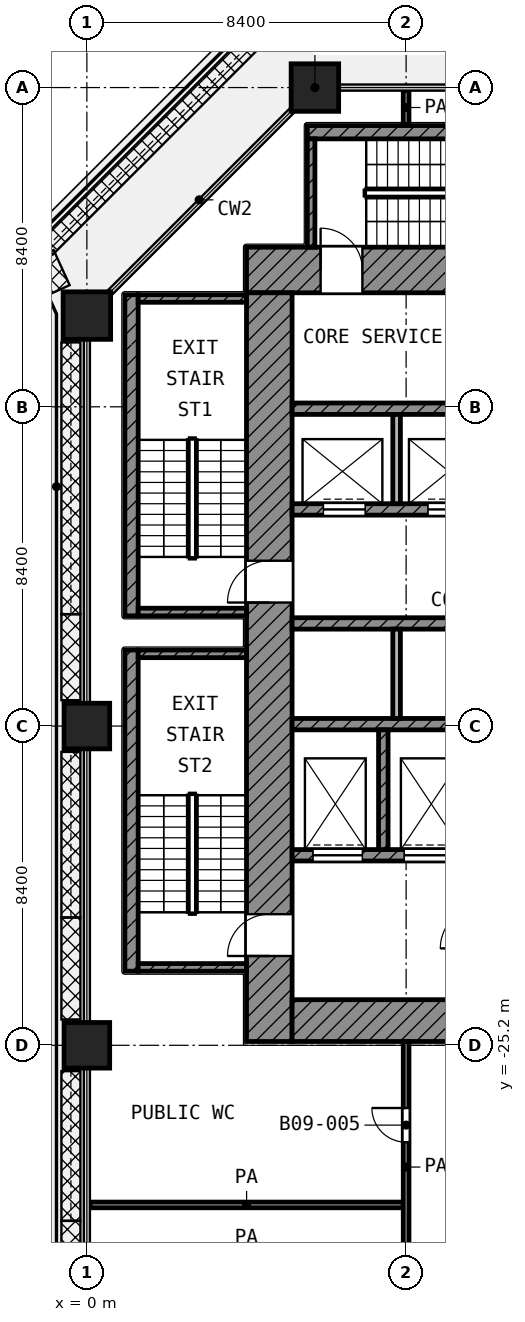
"""IFC4 building model, lengths in metres.
Left out: names, types, materials, properties, quantities, classifications, styles, units other than length and angle.
Written with IfcOpenShell. Run it as: python <this file> out.ifc"""

import sys

from ifc_helpers import new_model, si_unit, direction, frame, frame_2d, origin, origin_2d, place, context, subcontext, project, spatial, rectangle, extrude, element, fill, save


model = new_model("IFC4")
c1 = context("Model", 3, precision=1e-05, world=origin(), true_north=direction((0.0, 1.0)))
c2 = subcontext(c1, "Body", "Model", "MODEL_VIEW")
j1 = project(units=[si_unit("LENGTHUNIT", "METRE"), si_unit("PLANEANGLEUNIT", "RADIAN")], contexts=[c1])
p1 = place(None, origin())
s1 = spatial("IfcSite", under=j1, at=p1, CompositionType="ELEMENT")
p2 = place(p1, origin())
s2 = spatial("IfcBuilding", under=s1, at=p2, CompositionType="ELEMENT")
p3 = place(p2, frame((0.0, 0.0, 43.4)))
s3 = spatial("IfcBuildingStorey", under=s2, at=p3, CompositionType="ELEMENT", Elevation=43.4)
for number, where, z_axis, x_axis in (
    (1, (6.0, 0.0, 0.0), (0.0, 0.0, 1.0), (1.0, 0.0, 0.0)),
    (2, (0.0, -6.0, 0.0), (0.0, 0.0, 1.0), (1.0, 0.0, 0.0)),
):
    element("IfcColumn", number, at=place(p3, frame(where, z_axis=z_axis, x_axis=x_axis)), inside=s3, PredefinedType="COLUMN", context=c2, shape_type="SweptSolid", body=[
        extrude(rectangle(XDim=1.25, YDim=1.25, at=origin_2d()), origin(), (0.0, 0.0, 1.0), 4.2),
    ])
for number, where, z_axis, x_axis in (
    (3, (0.0, -16.8, 0.0), (0.0, 0.0, 1.0), (1.0, 0.0, 0.0)),
    (4, (0.0, -25.2, 0.0), (0.0, 0.0, 1.0), (1.0, 0.0, 0.0)),
):
    element("IfcColumn", number, at=place(p3, frame(where, z_axis=z_axis, x_axis=x_axis)), inside=s3, PredefinedType="COLUMN", context=c2, shape_type="SweptSolid", body=[
        extrude(rectangle(XDim=1.2, YDim=1.2, at=origin_2d()), origin(), (0.0, 0.0, 1.0), 4.2),
    ])
p4 = place(p3, frame((4.2, -4.8, 0.0), z_axis=(0.0, 0.0, 1.0), x_axis=(1.0, 0.0, 0.0)))
e5 = element("IfcWall", 5, at=p4, inside=s3, PredefinedType="SHEAR", context=c2, shape_type="SweptSolid", body=[
    extrude(rectangle(XDim=20.9, YDim=1.2, at=frame_2d((10.45, 0.0))), origin(), (0.0, 0.0, 1.0), 3.9),
])
p5 = place(p4, frame((1.95, 0.0, 0.0)))
e6 = element("IfcOpeningElement", 6, at=p5, cuts=e5, PredefinedType="OPENING", context=c2, shape_type="SweptSolid", body=[
    extrude(rectangle(XDim=1.1, YDim=2.1, at=frame_2d((0.55, 1.05))), frame((0.0, 0.61, 0.0), z_axis=(0.0, -1.0, 0.0), x_axis=(1.0, 0.0, 0.0)), (0.0, 0.0, 1.0), 1.22),
])
p6 = place(p4, frame((17.95, 0.0, 0.0)))
e7 = element("IfcOpeningElement", 7, at=p6, cuts=e5, PredefinedType="OPENING", context=c2, shape_type="SweptSolid", body=[
    extrude(rectangle(XDim=1.1, YDim=2.1, at=frame_2d((0.55, 1.05))), frame((0.0, 0.61, 0.0), z_axis=(0.0, -1.0, 0.0), x_axis=(1.0, 0.0, 0.0)), (0.0, 0.0, 1.0), 1.22),
])
p7 = place(p3, frame((4.8, -25.1, 0.0), z_axis=(0.0, 0.0, 1.0), x_axis=(0.0, 1.0, 0.0)))
e8 = element("IfcWall", 8, at=p7, inside=s3, PredefinedType="SHEAR", context=c2, shape_type="SweptSolid", body=[
    extrude(rectangle(XDim=19.7, YDim=1.2, at=frame_2d((9.85, 0.0))), origin(), (0.0, 0.0, 1.0), 3.9),
])
p8 = place(p7, frame((11.55, 0.0, 0.0)))
e9 = element("IfcOpeningElement", 9, at=p8, cuts=e8, PredefinedType="OPENING", context=c2, shape_type="SweptSolid", body=[
    extrude(rectangle(XDim=1.1, YDim=2.1, at=frame_2d((0.55, 1.05))), frame((0.0, 0.61, 0.0), z_axis=(0.0, -1.0, 0.0), x_axis=(1.0, 0.0, 0.0)), (0.0, 0.0, 1.0), 1.22),
])
p9 = place(p7, frame((2.25, 0.0, 0.0)))
e10 = element("IfcOpeningElement", 10, at=p9, cuts=e8, PredefinedType="OPENING", context=c2, shape_type="SweptSolid", body=[
    extrude(rectangle(XDim=1.1, YDim=2.1, at=frame_2d((0.55, 1.05))), frame((0.0, 0.61, 0.0), z_axis=(0.0, -1.0, 0.0), x_axis=(1.0, 0.0, 0.0)), (0.0, 0.0, 1.0), 1.22),
])
p10 = place(p3, frame((5.4, -24.55, 0.0), z_axis=(0.0, 0.0, 1.0), x_axis=(1.0, 0.0, 0.0)))
e11 = element("IfcWall", 11, at=p10, inside=s3, PredefinedType="SHEAR", context=c2, shape_type="SweptSolid", body=[
    extrude(rectangle(XDim=18.6, YDim=1.1, at=frame_2d((9.3, 0.0))), origin(), (0.0, 0.0, 1.0), 3.9),
])
p11 = place(p10, frame((6.3, 0.0, 0.0)))
e12 = element("IfcOpeningElement", 12, at=p11, cuts=e11, PredefinedType="OPENING", context=c2, shape_type="SweptSolid", body=[
    extrude(rectangle(XDim=1.8, YDim=2.1, at=frame_2d((0.9, 1.05))), frame((0.0, 0.56, 0.0), z_axis=(0.0, -1.0, 0.0), x_axis=(1.0, 0.0, 0.0)), (0.0, 0.0, 1.0), 1.12),
])
p12 = place(p3, frame((5.4, -8.45, 0.0), z_axis=(0.0, 0.0, 1.0), x_axis=(1.0, 0.0, 0.0)))
e13 = element("IfcWall", 13, at=p12, inside=s3, PredefinedType="SHEAR", context=c2, shape_type="SweptSolid", body=[
    extrude(rectangle(XDim=16.65, YDim=0.3, at=frame_2d((8.325, 0.0))), origin(), (0.0, 0.0, 1.0), 3.9),
])
p13 = place(p3, frame((5.4, -11.1, 0.0), z_axis=(0.0, 0.0, 1.0), x_axis=(1.0, 0.0, 0.0)))
e14 = element("IfcWall", 14, at=p13, inside=s3, PredefinedType="SHEAR", context=c2, shape_type="SweptSolid", body=[
    extrude(rectangle(XDim=16.65, YDim=0.3, at=frame_2d((8.325, 0.0))), origin(), (0.0, 0.0, 1.0), 3.9),
])
p14 = place(p13, frame((0.825, 0.0, 0.0)))
e15 = element("IfcOpeningElement", 15, at=p14, cuts=e14, PredefinedType="OPENING", context=c2, shape_type="SweptSolid", body=[
    extrude(rectangle(XDim=1.1, YDim=2.1, at=frame_2d((0.55, 1.05))), frame((0.0, 0.16, 0.0), z_axis=(0.0, -1.0, 0.0), x_axis=(1.0, 0.0, 0.0)), (0.0, 0.0, 1.0), 0.32),
])
p15 = place(p13, frame((3.575, 0.0, 0.0)))
e16 = element("IfcOpeningElement", 16, at=p15, cuts=e14, PredefinedType="OPENING", context=c2, shape_type="SweptSolid", body=[
    extrude(rectangle(XDim=1.1, YDim=2.1, at=frame_2d((0.55, 1.05))), frame((0.0, 0.16, 0.0), z_axis=(0.0, -1.0, 0.0), x_axis=(1.0, 0.0, 0.0)), (0.0, 0.0, 1.0), 0.32),
])
p16 = place(p13, frame((6.325, 0.0, 0.0)))
e17 = element("IfcOpeningElement", 17, at=p16, cuts=e14, PredefinedType="OPENING", context=c2, shape_type="SweptSolid", body=[
    extrude(rectangle(XDim=1.1, YDim=2.1, at=frame_2d((0.55, 1.05))), frame((0.0, 0.16, 0.0), z_axis=(0.0, -1.0, 0.0), x_axis=(1.0, 0.0, 0.0)), (0.0, 0.0, 1.0), 0.32),
])
p17 = place(p13, frame((9.075, 0.0, 0.0)))
e18 = element("IfcOpeningElement", 18, at=p17, cuts=e14, PredefinedType="OPENING", context=c2, shape_type="SweptSolid", body=[
    extrude(rectangle(XDim=1.1, YDim=2.1, at=frame_2d((0.55, 1.05))), frame((0.0, 0.16, 0.0), z_axis=(0.0, -1.0, 0.0), x_axis=(1.0, 0.0, 0.0)), (0.0, 0.0, 1.0), 0.32),
])
for number, where, z_axis, x_axis in (
    (19, (5.4, -14.1, 0.0), (0.0, 0.0, 1.0), (1.0, 0.0, 0.0)),
    (20, (5.4, -16.75, 0.0), (0.0, 0.0, 1.0), (1.0, 0.0, 0.0)),
):
    element("IfcWall", number, at=place(p3, frame(where, z_axis=z_axis, x_axis=x_axis)), inside=s3, PredefinedType="SHEAR", context=c2, shape_type="SweptSolid", body=[
        extrude(rectangle(XDim=16.65, YDim=0.3, at=frame_2d((8.325, 0.0))), origin(), (0.0, 0.0, 1.0), 3.9),
    ])
p18 = place(p3, frame((5.4, -20.2, 0.0), z_axis=(0.0, 0.0, 1.0), x_axis=(1.0, 0.0, 0.0)))
e21 = element("IfcWall", 21, at=p18, inside=s3, PredefinedType="SHEAR", context=c2, shape_type="SweptSolid", body=[
    extrude(rectangle(XDim=14.65, YDim=0.3, at=frame_2d((7.325, 0.0))), origin(), (0.0, 0.0, 1.0), 3.9),
])
p19 = place(p18, frame((10.55, 0.0, 0.0)))
e22 = element("IfcOpeningElement", 22, at=p19, cuts=e21, PredefinedType="OPENING", context=c2, shape_type="SweptSolid", body=[
    extrude(rectangle(XDim=1.3, YDim=2.1, at=frame_2d((0.65, 1.05))), frame((0.0, 0.16, 0.0), z_axis=(0.0, -1.0, 0.0), x_axis=(1.0, 0.0, 0.0)), (0.0, 0.0, 1.0), 0.32),
])
p20 = place(p18, frame((12.95, 0.0, 0.0)))
e23 = element("IfcOpeningElement", 23, at=p20, cuts=e21, PredefinedType="OPENING", context=c2, shape_type="SweptSolid", body=[
    extrude(rectangle(XDim=1.3, YDim=2.1, at=frame_2d((0.65, 1.05))), frame((0.0, 0.16, 0.0), z_axis=(0.0, -1.0, 0.0), x_axis=(1.0, 0.0, 0.0)), (0.0, 0.0, 1.0), 0.32),
])
p21 = place(p18, frame((0.55, 0.0, 0.0)))
e24 = element("IfcOpeningElement", 24, at=p21, cuts=e21, PredefinedType="OPENING", context=c2, shape_type="SweptSolid", body=[
    extrude(rectangle(XDim=1.3, YDim=2.1, at=frame_2d((0.65, 1.05))), frame((0.0, 0.16, 0.0), z_axis=(0.0, -1.0, 0.0), x_axis=(1.0, 0.0, 0.0)), (0.0, 0.0, 1.0), 0.32),
])
p22 = place(p18, frame((2.95, 0.0, 0.0)))
e25 = element("IfcOpeningElement", 25, at=p22, cuts=e21, PredefinedType="OPENING", context=c2, shape_type="SweptSolid", body=[
    extrude(rectangle(XDim=1.3, YDim=2.1, at=frame_2d((0.65, 1.05))), frame((0.0, 0.16, 0.0), z_axis=(0.0, -1.0, 0.0), x_axis=(1.0, 0.0, 0.0)), (0.0, 0.0, 1.0), 0.32),
])
p23 = place(p18, frame((5.35, 0.0, 0.0)))
e26 = element("IfcOpeningElement", 26, at=p23, cuts=e21, PredefinedType="OPENING", context=c2, shape_type="SweptSolid", body=[
    extrude(rectangle(XDim=0.9, YDim=2.1, at=frame_2d((0.45, 1.05))), frame((0.0, 0.16, 0.0), z_axis=(0.0, -1.0, 0.0), x_axis=(1.0, 0.0, 0.0)), (0.0, 0.0, 1.0), 0.32),
])
p24 = place(p18, frame((7.75, 0.0, 0.0)))
e27 = element("IfcOpeningElement", 27, at=p24, cuts=e21, PredefinedType="OPENING", context=c2, shape_type="SweptSolid", body=[
    extrude(rectangle(XDim=0.9, YDim=2.1, at=frame_2d((0.45, 1.05))), frame((0.0, 0.16, 0.0), z_axis=(0.0, -1.0, 0.0), x_axis=(1.0, 0.0, 0.0)), (0.0, 0.0, 1.0), 0.32),
])
p25 = place(p3, frame((7.8, -20.05, 0.0), z_axis=(0.0, 0.0, 1.0), x_axis=(0.0, 1.0, 0.0)))
e28 = element("IfcWall", 28, at=p25, inside=s3, PredefinedType="SHEAR", context=c2, shape_type="SweptSolid", body=[
    extrude(rectangle(XDim=3.15, YDim=0.25, at=frame_2d((1.575, 0.0))), origin(), (0.0, 0.0, 1.0), 3.9),
])
p26 = place(p3, frame((8.15, -10.95, 0.0), z_axis=(0.0, 0.0, 1.0), x_axis=(0.0, 1.0, 0.0)))
e29 = element("IfcWall", 29, at=p26, inside=s3, PredefinedType="PARTITIONING", context=c2, shape_type="SweptSolid", body=[
    extrude(rectangle(XDim=2.35, YDim=0.2, at=frame_2d((1.175, 0.0))), origin(), (0.0, 0.0, 1.0), 3.9),
])
p27 = place(p3, frame((8.15, -16.6, 0.0), z_axis=(0.0, 0.0, 1.0), x_axis=(0.0, 1.0, 0.0)))
e30 = element("IfcWall", 30, at=p27, inside=s3, PredefinedType="PARTITIONING", context=c2, shape_type="SweptSolid", body=[
    extrude(rectangle(XDim=2.35, YDim=0.2, at=frame_2d((1.175, 0.0))), origin(), (0.0, 0.0, 1.0), 3.9),
])
p28 = place(p3, frame((1.175, -13.9, 0.0), z_axis=(0.0, 0.0, 1.0), x_axis=(0.0, 1.0, 0.0)))
e31 = element("IfcWall", 31, at=p28, inside=s3, PredefinedType="SHEAR", context=c2, shape_type="SweptSolid", body=[
    extrude(rectangle(XDim=8.45, YDim=0.35, at=frame_2d((4.225, 0.0))), origin(), (0.0, 0.0, 1.0), 3.9),
])
for number, where, z_axis, x_axis in (
    (32, (1.35, -5.55, 0.0), (0.0, 0.0, 1.0), (1.0, 0.0, 0.0)),
    (33, (1.35, -13.8, 0.0), (0.0, 0.0, 1.0), (1.0, 0.0, 0.0)),
):
    element("IfcWall", number, at=place(p3, frame(where, z_axis=z_axis, x_axis=x_axis)), inside=s3, PredefinedType="SHEAR", context=c2, shape_type="SweptSolid", body=[
        extrude(rectangle(XDim=2.85, YDim=0.2, at=frame_2d((1.425, 0.0))), origin(), (0.0, 0.0, 1.0), 3.9),
    ])
p29 = place(p3, frame((1.175, -23.25, 0.0), z_axis=(0.0, 0.0, 1.0), x_axis=(0.0, 1.0, 0.0)))
e34 = element("IfcWall", 34, at=p29, inside=s3, PredefinedType="SHEAR", context=c2, shape_type="SweptSolid", body=[
    extrude(rectangle(XDim=8.45, YDim=0.35, at=frame_2d((4.225, 0.0))), origin(), (0.0, 0.0, 1.0), 3.9),
])
for number, where, z_axis, x_axis in (
    (35, (1.35, -14.9, 0.0), (0.0, 0.0, 1.0), (1.0, 0.0, 0.0)),
    (36, (1.35, -23.15, 0.0), (0.0, 0.0, 1.0), (1.0, 0.0, 0.0)),
):
    element("IfcWall", number, at=place(p3, frame(where, z_axis=z_axis, x_axis=x_axis)), inside=s3, PredefinedType="SHEAR", context=c2, shape_type="SweptSolid", body=[
        extrude(rectangle(XDim=2.85, YDim=0.2, at=frame_2d((1.425, 0.0))), origin(), (0.0, 0.0, 1.0), 3.9),
    ])
p30 = place(p3, frame((5.8, -1.175, 0.0), z_axis=(0.0, 0.0, 1.0), x_axis=(1.0, 0.0, 0.0)))
e37 = element("IfcWall", 37, at=p30, inside=s3, PredefinedType="SHEAR", context=c2, shape_type="SweptSolid", body=[
    extrude(rectangle(XDim=8.45, YDim=0.35, at=frame_2d((4.225, 0.0))), origin(), (0.0, 0.0, 1.0), 3.9),
])
p31 = place(p3, frame((5.9, -4.2, 0.0), z_axis=(0.0, 0.0, 1.0), x_axis=(0.0, 1.0, 0.0)))
e38 = element("IfcWall", 38, at=p31, inside=s3, PredefinedType="SHEAR", context=c2, shape_type="SweptSolid", body=[
    extrude(rectangle(XDim=2.85, YDim=0.2, at=frame_2d((1.425, 0.0))), origin(), (0.0, 0.0, 1.0), 3.9),
])
p32 = place(p3, frame((0.08, -29.4, 0.0), z_axis=(0.0, 0.0, 1.0), x_axis=(1.0, 0.0, 0.0)))
e39 = element("IfcWall", 39, at=p32, inside=s3, PredefinedType="PARTITIONING", context=c2, shape_type="SweptSolid", body=[
    extrude(rectangle(XDim=8.245, YDim=0.15, at=frame_2d((4.123, 0.0))), origin(), (0.0, 0.0, 1.0), 3.9),
])
p33 = place(p3, frame((8.4, -31.707, 0.0), z_axis=(0.0, 0.0, 1.0), x_axis=(0.0, 1.0, 0.0)))
e40 = element("IfcWall", 40, at=p33, inside=s3, PredefinedType="PARTITIONING", context=c2, shape_type="SweptSolid", body=[
    extrude(rectangle(XDim=6.607, YDim=0.15, at=frame_2d((3.303, 0.0))), origin(), (0.0, 0.0, 1.0), 3.9),
])
p34 = place(p33, frame((3.957, 0.0, 0.0)))
e41 = element("IfcOpeningElement", 41, at=p34, cuts=e40, PredefinedType="OPENING", context=c2, shape_type="SweptSolid", body=[
    extrude(rectangle(XDim=0.9, YDim=2.1, at=frame_2d((0.45, 1.05))), frame((0.0, 0.085, 0.0), z_axis=(0.0, -1.0, 0.0), x_axis=(1.0, 0.0, 0.0)), (0.0, 0.0, 1.0), 0.17),
])
p35 = place(p3, frame((8.4, -0.97, 0.0), z_axis=(0.0, 0.0, 1.0), x_axis=(0.0, 1.0, 0.0)))
e42 = element("IfcWall", 42, at=p35, inside=s3, PredefinedType="PARTITIONING", context=c2, shape_type="SweptSolid", body=[
    extrude(rectangle(XDim=0.89, YDim=0.15, at=frame_2d((0.445, 0.0))), origin(), (0.0, 0.0, 1.0), 3.9),
])
p36 = place(p14, origin())
e43 = element("IfcDoor", 43, at=p36, inside=s3, OperationType="DOUBLE_DOOR_SLIDING", PredefinedType="DOOR", context=c2, shape_type="SweptSolid", body=[
    extrude(rectangle(XDim=1.1, YDim=2.1, at=frame_2d((0.55, 1.05))), frame((0.0, 0.025, 0.0), z_axis=(0.0, -1.0, 0.0), x_axis=(1.0, 0.0, 0.0)), (0.0, 0.0, 1.0), 0.05),
])
fill(e15, e43)
p37 = place(p15, origin())
e44 = element("IfcDoor", 44, at=p37, inside=s3, OperationType="DOUBLE_DOOR_SLIDING", PredefinedType="DOOR", context=c2, shape_type="SweptSolid", body=[
    extrude(rectangle(XDim=1.1, YDim=2.1, at=frame_2d((0.55, 1.05))), frame((0.0, 0.025, 0.0), z_axis=(0.0, -1.0, 0.0), x_axis=(1.0, 0.0, 0.0)), (0.0, 0.0, 1.0), 0.05),
])
fill(e16, e44)
p38 = place(p21, origin())
e45 = element("IfcDoor", 45, at=p38, inside=s3, OperationType="DOUBLE_DOOR_SLIDING", PredefinedType="DOOR", context=c2, shape_type="SweptSolid", body=[
    extrude(rectangle(XDim=1.3, YDim=2.1, at=frame_2d((0.65, 1.05))), frame((0.0, 0.025, 0.0), z_axis=(0.0, -1.0, 0.0), x_axis=(1.0, 0.0, 0.0)), (0.0, 0.0, 1.0), 0.05),
])
fill(e24, e45)
p39 = place(p22, origin())
e46 = element("IfcDoor", 46, at=p39, inside=s3, OperationType="DOUBLE_DOOR_SLIDING", PredefinedType="DOOR", context=c2, shape_type="SweptSolid", body=[
    extrude(rectangle(XDim=1.3, YDim=2.1, at=frame_2d((0.65, 1.05))), frame((0.0, 0.025, 0.0), z_axis=(0.0, -1.0, 0.0), x_axis=(1.0, 0.0, 0.0)), (0.0, 0.0, 1.0), 0.05),
])
fill(e25, e46)
p40 = place(p8, origin())
e47 = element("IfcDoor", 47, at=p40, inside=s3, OperationType="SINGLE_SWING_LEFT", PredefinedType="DOOR", context=c2, shape_type="SweptSolid", body=[
    extrude(rectangle(XDim=1.1, YDim=2.1, at=frame_2d((0.55, 1.05))), frame((0.0, 0.025, 0.0), z_axis=(0.0, -1.0, 0.0), x_axis=(1.0, 0.0, 0.0)), (0.0, 0.0, 1.0), 0.05),
])
fill(e9, e47)
p41 = place(p9, origin())
e48 = element("IfcDoor", 48, at=p41, inside=s3, OperationType="SINGLE_SWING_LEFT", PredefinedType="DOOR", context=c2, shape_type="SweptSolid", body=[
    extrude(rectangle(XDim=1.1, YDim=2.1, at=frame_2d((0.55, 1.05))), frame((0.0, 0.025, 0.0), z_axis=(0.0, -1.0, 0.0), x_axis=(1.0, 0.0, 0.0)), (0.0, 0.0, 1.0), 0.05),
])
fill(e10, e48)
p42 = place(p5, origin())
e49 = element("IfcDoor", 49, at=p42, inside=s3, OperationType="SINGLE_SWING_LEFT", PredefinedType="DOOR", context=c2, shape_type="SweptSolid", body=[
    extrude(rectangle(XDim=1.1, YDim=2.1, at=frame_2d((0.55, 1.05))), frame((0.0, 0.025, 0.0), z_axis=(0.0, -1.0, 0.0), x_axis=(1.0, 0.0, 0.0)), (0.0, 0.0, 1.0), 0.05),
])
fill(e6, e49)
p43 = place(p34, origin())
e50 = element("IfcDoor", 50, at=p43, inside=s3, OperationType="SINGLE_SWING_RIGHT", PredefinedType="DOOR", context=c2, shape_type="SweptSolid", body=[
    extrude(rectangle(XDim=0.9, YDim=2.1, at=frame_2d((0.45, 1.05))), frame((0.0, 0.025, 0.0), z_axis=(0.0, -1.0, 0.0), x_axis=(1.0, 0.0, 0.0)), (0.0, 0.0, 1.0), 0.05),
])
fill(e41, e50)
save(model, sys.argv[1])
